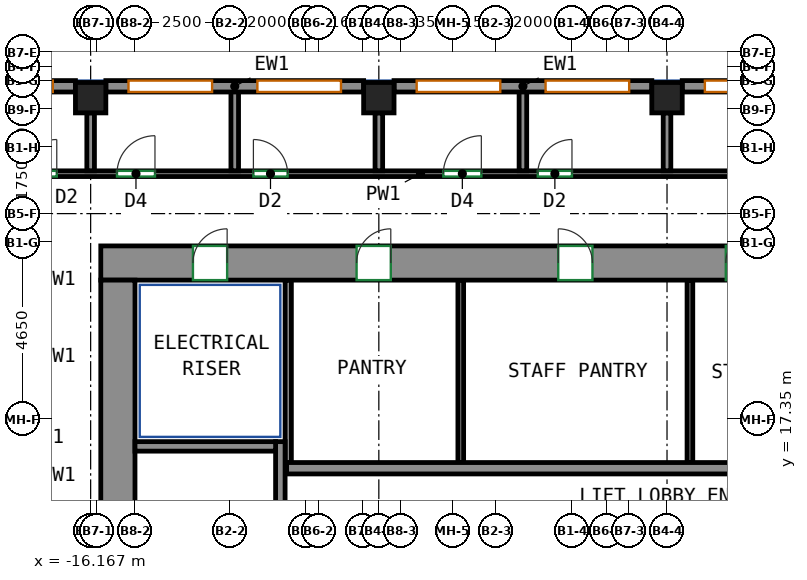
"""IFC4 building model, lengths in metres.
Left out: names, types, materials, properties, quantities, classifications, styles, units other than length and angle.
Written with IfcOpenShell. Run it as: python <this file> out.ifc"""

import sys

from ifc_helpers import new_model, si_unit, direction, frame, frame_2d, origin, origin_2d, place, context, subcontext, project, spatial, rectangle, extrude, source, transform, mapped, element, fill, save


model = new_model("IFC4")
c1 = context("Model", 3, precision=1e-05, world=origin(), true_north=direction((0.0, 1.0)))
c2 = subcontext(c1, "Body", "Model", "MODEL_VIEW")
j1 = project(units=[si_unit("LENGTHUNIT", "METRE"), si_unit("PLANEANGLEUNIT", "RADIAN")], contexts=[c1])
p1 = place(None, origin())
s1 = spatial("IfcSite", under=j1, at=p1, CompositionType="ELEMENT")
p2 = place(p1, origin())
s2 = spatial("IfcBuilding", under=s1, at=p2, CompositionType="ELEMENT")
p3 = place(p2, frame((0.0, 0.0, 171.9)))
s3 = spatial("IfcBuildingStorey", under=s2, at=p3, CompositionType="ELEMENT", Elevation=171.9)
m1 = source(origin(), c2, "Body", "SweptSolid", [
    extrude(rectangle(XDim=0.8, YDim=0.8, at=origin_2d()), origin(), (0.0, 0.0, 1.0), 3.12),
])
for number, where, z_axis, x_axis in (
    (1, (-16.167, 25.8, 0.0), (0.0, 0.0, 1.0), (1.0, 0.0, 0.0)),
    (2, (-8.583, 25.8, 0.0), (0.0, 0.0, 1.0), (1.0, 0.0, 0.0)),
    (3, (-1.0, 25.8, 0.0), (0.0, 0.0, 1.0), (1.0, 0.0, 0.0)),
):
    element("IfcColumn", number, at=place(p3, frame(where, z_axis=z_axis, x_axis=x_axis)), inside=s3, PredefinedType="COLUMN", context=c2, shape_type="MappedRepresentation", body=[
        mapped(m1, transform((0.0, 0.0, 0.0))),
    ])
m2 = source(origin(), c2, "Body", "SweptSolid", [
    extrude(rectangle(XDim=33.9, YDim=0.9, at=frame_2d((16.95, 0.0))), origin(), (0.0, 0.0, 1.0), 3.12),
])
p4 = place(p3, frame((-15.9, 21.45, 0.0), z_axis=(0.0, 0.0, 1.0), x_axis=(1.0, 0.0, 0.0)))
e4 = element("IfcWall", 4, at=p4, inside=s3, PredefinedType="SHEAR", context=c2, shape_type="MappedRepresentation", body=[
    mapped(m2, transform((0.0, 0.0, 0.0))),
])
p5 = place(p4, frame((6.731, 0.0, 0.0)))
e5 = element("IfcOpeningElement", 5, at=p5, cuts=e4, PredefinedType="OPENING", context=c2, shape_type="SweptSolid", body=[
    extrude(rectangle(XDim=0.9, YDim=2.1, at=frame_2d((0.45, 1.05))), frame((0.0, 0.46, 0.0), z_axis=(0.0, -1.0, 0.0), x_axis=(1.0, 0.0, 0.0)), (0.0, 0.0, 1.0), 0.92),
])
p6 = place(p4, frame((12.038, 0.0, 0.0)))
e6 = element("IfcOpeningElement", 6, at=p6, cuts=e4, PredefinedType="OPENING", context=c2, shape_type="SweptSolid", body=[
    extrude(rectangle(XDim=0.9, YDim=2.1, at=frame_2d((0.45, 1.05))), frame((0.0, 0.46, 0.0), z_axis=(0.0, -1.0, 0.0), x_axis=(1.0, 0.0, 0.0)), (0.0, 0.0, 1.0), 0.92),
])
p7 = place(p4, frame((16.446, 0.0, 0.0)))
e7 = element("IfcOpeningElement", 7, at=p7, cuts=e4, PredefinedType="OPENING", context=c2, shape_type="SweptSolid", body=[
    extrude(rectangle(XDim=0.9, YDim=2.1, at=frame_2d((0.45, 1.05))), frame((0.0, 0.46, 0.0), z_axis=(0.0, -1.0, 0.0), x_axis=(1.0, 0.0, 0.0)), (0.0, 0.0, 1.0), 0.92),
])
p8 = place(p4, frame((18.858, 0.0, 0.0)))
e8 = element("IfcOpeningElement", 8, at=p8, cuts=e4, PredefinedType="OPENING", context=c2, shape_type="SweptSolid", body=[
    extrude(rectangle(XDim=0.9, YDim=2.1, at=frame_2d((0.45, 1.05))), frame((0.0, 0.46, 0.0), z_axis=(0.0, -1.0, 0.0), x_axis=(1.0, 0.0, 0.0)), (0.0, 0.0, 1.0), 0.92),
])
p9 = place(p4, frame((21.686, 0.0, 0.0)))
e9 = element("IfcOpeningElement", 9, at=p9, cuts=e4, PredefinedType="OPENING", context=c2, shape_type="SweptSolid", body=[
    extrude(rectangle(XDim=0.9, YDim=2.1, at=frame_2d((0.45, 1.05))), frame((0.0, 0.46, 0.0), z_axis=(0.0, -1.0, 0.0), x_axis=(1.0, 0.0, 0.0)), (0.0, 0.0, 1.0), 0.92),
])
p10 = place(p4, frame((26.027, 0.0, 0.0)))
e10 = element("IfcOpeningElement", 10, at=p10, cuts=e4, PredefinedType="OPENING", context=c2, shape_type="SweptSolid", body=[
    extrude(rectangle(XDim=0.9, YDim=2.1, at=frame_2d((0.45, 1.05))), frame((0.0, 0.46, 0.0), z_axis=(0.0, -1.0, 0.0), x_axis=(1.0, 0.0, 0.0)), (0.0, 0.0, 1.0), 0.92),
])
p11 = place(p4, frame((2.425, 0.0, 0.0)))
e11 = element("IfcOpeningElement", 11, at=p11, cuts=e4, PredefinedType="OPENING", context=c2, shape_type="SweptSolid", body=[
    extrude(rectangle(XDim=0.9, YDim=2.1, at=frame_2d((0.45, 1.05))), frame((0.0, 0.46, 0.0), z_axis=(0.0, -1.0, 0.0), x_axis=(1.0, 0.0, 0.0)), (0.0, 0.0, 1.0), 0.92),
])
p12 = place(p4, frame((30.575, 0.0, 0.0)))
e12 = element("IfcOpeningElement", 12, at=p12, cuts=e4, PredefinedType="OPENING", context=c2, shape_type="SweptSolid", body=[
    extrude(rectangle(XDim=0.9, YDim=2.1, at=frame_2d((0.45, 1.05))), frame((0.0, 0.46, 0.0), z_axis=(0.0, -1.0, 0.0), x_axis=(1.0, 0.0, 0.0)), (0.0, 0.0, 1.0), 0.92),
])
m3 = source(origin(), c2, "Body", "SweptSolid", [
    extrude(rectangle(XDim=12.0, YDim=0.9, at=frame_2d((6.0, 0.0))), origin(), (0.0, 0.0, 1.0), 3.12),
])
p13 = place(p3, frame((-15.45, 9.0, 0.0), z_axis=(0.0, 0.0, 1.0), x_axis=(0.0, 1.0, 0.0)))
e13 = element("IfcWall", 13, at=p13, inside=s3, PredefinedType="SHEAR", context=c2, shape_type="MappedRepresentation", body=[
    mapped(m3, transform((0.0, 0.0, 0.0))),
])
m4 = source(origin(), c2, "Body", "SweptSolid", [
    extrude(rectangle(XDim=7.75, YDim=0.25, at=frame_2d((3.875, 0.0))), origin(), (0.0, 0.0, 1.0), 3.12),
])
p14 = place(p3, frame((-11.175, 9.0, 0.0), z_axis=(0.0, 0.0, 1.0), x_axis=(0.0, 1.0, 0.0)))
e14 = element("IfcWall", 14, at=p14, inside=s3, PredefinedType="SHEAR", context=c2, shape_type="MappedRepresentation", body=[
    mapped(m4, transform((0.0, 0.0, 0.0))),
])
m5 = source(origin(), c2, "Body", "SweptSolid", [
    extrude(rectangle(XDim=3.7, YDim=0.25, at=frame_2d((1.85, 0.0))), origin(), (0.0, 0.0, 1.0), 3.12),
])
p15 = place(p3, frame((-15.0, 16.625, 0.0), z_axis=(0.0, 0.0, 1.0), x_axis=(1.0, 0.0, 0.0)))
e15 = element("IfcWall", 15, at=p15, inside=s3, PredefinedType="SHEAR", context=c2, shape_type="MappedRepresentation", body=[
    mapped(m5, transform((0.0, 0.0, 0.0))),
])
m6 = source(origin(), c2, "Body", "SweptSolid", [
    extrude(rectangle(XDim=14.04, YDim=0.3, at=frame_2d((7.02, 0.0))), origin(), (0.0, 0.0, 1.0), 3.12),
])
p16 = place(p3, frame((-11.01, 16.05, 0.0), z_axis=(0.0, 0.0, 1.0), x_axis=(1.0, 0.0, 0.0)))
e16 = element("IfcWall", 16, at=p16, inside=s3, PredefinedType="SHEAR", context=c2, shape_type="MappedRepresentation", body=[
    mapped(m6, transform((0.0, 0.0, 0.0))),
])
m7 = source(origin(), c2, "Body", "SweptSolid", [
    extrude(rectangle(XDim=6.783, YDim=0.3, at=frame_2d((3.392, 0.0))), origin(), (0.0, 0.0, 1.0), 3.12),
])
p17 = place(p3, frame((6.183, 26.1, 0.0), z_axis=(0.0, 0.0, 1.0), x_axis=(-1.0, 0.0, 0.0)))
e17 = element("IfcWall", 17, at=p17, inside=s3, PredefinedType="SOLIDWALL", context=c2, shape_type="MappedRepresentation", body=[
    mapped(m7, transform((0.0, 0.0, 0.0))),
])
p18 = place(p17, frame((0.596, 0.0, 0.85)))
e18 = element("IfcOpeningElement", 18, at=p18, cuts=e17, PredefinedType="OPENING", context=c2, shape_type="SweptSolid", body=[
    extrude(rectangle(XDim=2.2, YDim=1.95, at=frame_2d((1.1, 0.975))), frame((0.0, 0.16, 0.0), z_axis=(0.0, -1.0, 0.0), x_axis=(1.0, 0.0, 0.0)), (0.0, 0.0, 1.0), 0.32),
])
p19 = place(p17, frame((3.988, 0.0, 0.85)))
e19 = element("IfcOpeningElement", 19, at=p19, cuts=e17, PredefinedType="OPENING", context=c2, shape_type="SweptSolid", body=[
    extrude(rectangle(XDim=2.2, YDim=1.95, at=frame_2d((1.1, 0.975))), frame((0.0, 0.16, 0.0), z_axis=(0.0, -1.0, 0.0), x_axis=(1.0, 0.0, 0.0)), (0.0, 0.0, 1.0), 0.32),
])
p20 = place(p3, frame((-1.4, 26.1, 0.0), z_axis=(0.0, 0.0, 1.0), x_axis=(-1.0, 0.0, 0.0)))
e20 = element("IfcWall", 20, at=p20, inside=s3, PredefinedType="SOLIDWALL", context=c2, shape_type="MappedRepresentation", body=[
    mapped(m7, transform((0.0, 0.0, 0.0))),
])
p21 = place(p20, frame((0.596, 0.0, 0.85)))
e21 = element("IfcOpeningElement", 21, at=p21, cuts=e20, PredefinedType="OPENING", context=c2, shape_type="SweptSolid", body=[
    extrude(rectangle(XDim=2.2, YDim=1.95, at=frame_2d((1.1, 0.975))), frame((0.0, 0.16, 0.0), z_axis=(0.0, -1.0, 0.0), x_axis=(1.0, 0.0, 0.0)), (0.0, 0.0, 1.0), 0.32),
])
p22 = place(p20, frame((3.988, 0.0, 0.85)))
e22 = element("IfcOpeningElement", 22, at=p22, cuts=e20, PredefinedType="OPENING", context=c2, shape_type="SweptSolid", body=[
    extrude(rectangle(XDim=2.2, YDim=1.95, at=frame_2d((1.1, 0.975))), frame((0.0, 0.16, 0.0), z_axis=(0.0, -1.0, 0.0), x_axis=(1.0, 0.0, 0.0)), (0.0, 0.0, 1.0), 0.32),
])
m8 = source(origin(), c2, "Body", "SweptSolid", [
    extrude(rectangle(XDim=6.783, YDim=0.3, at=frame_2d((3.392, 0.0))), origin(), (0.0, 0.0, 1.0), 3.12),
])
p23 = place(p3, frame((-8.983, 26.1, 0.0), z_axis=(0.0, 0.0, 1.0), x_axis=(-1.0, 0.0, 0.0)))
e23 = element("IfcWall", 23, at=p23, inside=s3, PredefinedType="SOLIDWALL", context=c2, shape_type="MappedRepresentation", body=[
    mapped(m8, transform((0.0, 0.0, 0.0))),
])
p24 = place(p23, frame((0.596, 0.0, 0.85)))
e24 = element("IfcOpeningElement", 24, at=p24, cuts=e23, PredefinedType="OPENING", context=c2, shape_type="SweptSolid", body=[
    extrude(rectangle(XDim=2.2, YDim=1.95, at=frame_2d((1.1, 0.975))), frame((0.0, 0.16, 0.0), z_axis=(0.0, -1.0, 0.0), x_axis=(1.0, 0.0, 0.0)), (0.0, 0.0, 1.0), 0.32),
])
p25 = place(p23, frame((3.988, 0.0, 0.85)))
e25 = element("IfcOpeningElement", 25, at=p25, cuts=e23, PredefinedType="OPENING", context=c2, shape_type="SweptSolid", body=[
    extrude(rectangle(XDim=2.2, YDim=1.95, at=frame_2d((1.1, 0.975))), frame((0.0, 0.16, 0.0), z_axis=(0.0, -1.0, 0.0), x_axis=(1.0, 0.0, 0.0)), (0.0, 0.0, 1.0), 0.32),
])
p26 = place(p3, frame((-16.567, 26.1, 0.0), z_axis=(0.0, 0.0, 1.0), x_axis=(-1.0, 0.0, 0.0)))
e26 = element("IfcWall", 26, at=p26, inside=s3, PredefinedType="SOLIDWALL", context=c2, shape_type="MappedRepresentation", body=[
    mapped(m7, transform((0.0, 0.0, 0.0))),
])
p27 = place(p26, frame((0.596, 0.0, 0.85)))
e27 = element("IfcOpeningElement", 27, at=p27, cuts=e26, PredefinedType="OPENING", context=c2, shape_type="SweptSolid", body=[
    extrude(rectangle(XDim=2.2, YDim=1.95, at=frame_2d((1.1, 0.975))), frame((0.0, 0.16, 0.0), z_axis=(0.0, -1.0, 0.0), x_axis=(1.0, 0.0, 0.0)), (0.0, 0.0, 1.0), 0.32),
])
p28 = place(p26, frame((3.988, 0.0, 0.85)))
e28 = element("IfcOpeningElement", 28, at=p28, cuts=e26, PredefinedType="OPENING", context=c2, shape_type="SweptSolid", body=[
    extrude(rectangle(XDim=2.2, YDim=1.95, at=frame_2d((1.1, 0.975))), frame((0.0, 0.16, 0.0), z_axis=(0.0, -1.0, 0.0), x_axis=(1.0, 0.0, 0.0)), (0.0, 0.0, 1.0), 0.32),
])
m9 = source(origin(), c2, "Body", "SweptSolid", [
    extrude(rectangle(XDim=4.8, YDim=0.165, at=frame_2d((2.4, 0.0))), origin(), (0.0, 0.0, 1.0), 3.12),
])
p29 = place(p3, frame((-10.968, 16.2, 0.0), z_axis=(0.0, 0.0, 1.0), x_axis=(0.0, 1.0, 0.0)))
e29 = element("IfcWall", 29, at=p29, inside=s3, PredefinedType="PARTITIONING", context=c2, shape_type="MappedRepresentation", body=[
    mapped(m9, transform((0.0, 0.0, 0.0))),
])
m10 = source(origin(), c2, "Body", "SweptSolid", [
    extrude(rectangle(XDim=4.8, YDim=0.15, at=frame_2d((2.4, 0.0))), origin(), (0.0, 0.0, 1.0), 3.12),
])
for number, where, z_axis, x_axis in (
    (30, (-6.427, 16.2, 0.0), (0.0, 0.0, 1.0), (0.0, 1.0, 0.0)),
    (31, (-0.397, 16.2, 0.0), (0.0, 0.0, 1.0), (0.0, 1.0, 0.0)),
):
    element("IfcWall", number, at=place(p3, frame(where, z_axis=z_axis, x_axis=x_axis)), inside=s3, PredefinedType="PARTITIONING", context=c2, shape_type="MappedRepresentation", body=[
        mapped(m10, transform((0.0, 0.0, 0.0))),
    ])
p30 = place(p3, frame((-20.059, 23.8, 0.0), z_axis=(0.0, 0.0, 1.0), x_axis=(1.0, 0.0, 0.0)))
e32 = element("IfcWall", 32, at=p30, inside=s3, PredefinedType="PARTITIONING", context=c2, shape_type="SweptSolid", body=[
    extrude(rectangle(XDim=41.909, YDim=0.15, at=frame_2d((20.955, 0.0))), origin(), (0.0, 0.0, 1.0), 3.12),
])
p31 = place(p30, frame((2.101, 0.0, 0.0)))
e33 = element("IfcOpeningElement", 33, at=p31, cuts=e32, PredefinedType="OPENING", context=c2, shape_type="SweptSolid", body=[
    extrude(rectangle(XDim=0.9, YDim=2.1, at=frame_2d((0.45, 1.05))), frame((0.0, 0.085, 0.0), z_axis=(0.0, -1.0, 0.0), x_axis=(1.0, 0.0, 0.0)), (0.0, 0.0, 1.0), 0.17),
])
p32 = place(p30, frame((4.585, 0.0, 0.0)))
e34 = element("IfcOpeningElement", 34, at=p32, cuts=e32, PredefinedType="OPENING", context=c2, shape_type="SweptSolid", body=[
    extrude(rectangle(XDim=1.0, YDim=2.1, at=frame_2d((0.5, 1.05))), frame((0.0, 0.085, 0.0), z_axis=(0.0, -1.0, 0.0), x_axis=(1.0, 0.0, 0.0)), (0.0, 0.0, 1.0), 0.17),
])
p33 = place(p30, frame((8.175, 0.0, 0.0)))
e35 = element("IfcOpeningElement", 35, at=p33, cuts=e32, PredefinedType="OPENING", context=c2, shape_type="SweptSolid", body=[
    extrude(rectangle(XDim=0.9, YDim=2.1, at=frame_2d((0.45, 1.05))), frame((0.0, 0.085, 0.0), z_axis=(0.0, -1.0, 0.0), x_axis=(1.0, 0.0, 0.0)), (0.0, 0.0, 1.0), 0.17),
])
p34 = place(p30, frame((13.173, 0.0, 0.0)))
e36 = element("IfcOpeningElement", 36, at=p34, cuts=e32, PredefinedType="OPENING", context=c2, shape_type="SweptSolid", body=[
    extrude(rectangle(XDim=1.0, YDim=2.1, at=frame_2d((0.5, 1.05))), frame((0.0, 0.085, 0.0), z_axis=(0.0, -1.0, 0.0), x_axis=(1.0, 0.0, 0.0)), (0.0, 0.0, 1.0), 0.17),
])
p35 = place(p30, frame((15.658, 0.0, 0.0)))
e37 = element("IfcOpeningElement", 37, at=p35, cuts=e32, PredefinedType="OPENING", context=c2, shape_type="SweptSolid", body=[
    extrude(rectangle(XDim=0.9, YDim=2.1, at=frame_2d((0.45, 1.05))), frame((0.0, 0.085, 0.0), z_axis=(0.0, -1.0, 0.0), x_axis=(1.0, 0.0, 0.0)), (0.0, 0.0, 1.0), 0.17),
])
p36 = place(p30, frame((21.315, 0.0, 0.0)))
e38 = element("IfcOpeningElement", 38, at=p36, cuts=e32, PredefinedType="OPENING", context=c2, shape_type="SweptSolid", body=[
    extrude(rectangle(XDim=0.9, YDim=2.1, at=frame_2d((0.45, 1.05))), frame((0.0, 0.085, 0.0), z_axis=(0.0, -1.0, 0.0), x_axis=(1.0, 0.0, 0.0)), (0.0, 0.0, 1.0), 0.17),
])
p37 = place(p30, frame((24.625, 0.0, 0.0)))
e39 = element("IfcOpeningElement", 39, at=p37, cuts=e32, PredefinedType="OPENING", context=c2, shape_type="SweptSolid", body=[
    extrude(rectangle(XDim=1.0, YDim=2.1, at=frame_2d((0.5, 1.05))), frame((0.0, 0.085, 0.0), z_axis=(0.0, -1.0, 0.0), x_axis=(1.0, 0.0, 0.0)), (0.0, 0.0, 1.0), 0.17),
])
p38 = place(p30, frame((29.043, 0.0, 0.0)))
e40 = element("IfcOpeningElement", 40, at=p38, cuts=e32, PredefinedType="OPENING", context=c2, shape_type="SweptSolid", body=[
    extrude(rectangle(XDim=0.9, YDim=2.1, at=frame_2d((0.45, 1.05))), frame((0.0, 0.085, 0.0), z_axis=(0.0, -1.0, 0.0), x_axis=(1.0, 0.0, 0.0)), (0.0, 0.0, 1.0), 0.17),
])
p39 = place(p30, frame((32.735, 0.0, 0.0)))
e41 = element("IfcOpeningElement", 41, at=p39, cuts=e32, PredefinedType="OPENING", context=c2, shape_type="SweptSolid", body=[
    extrude(rectangle(XDim=1.0, YDim=2.1, at=frame_2d((0.5, 1.05))), frame((0.0, 0.085, 0.0), z_axis=(0.0, -1.0, 0.0), x_axis=(1.0, 0.0, 0.0)), (0.0, 0.0, 1.0), 0.17),
])
p40 = place(p30, frame((36.627, 0.0, 0.0)))
e42 = element("IfcOpeningElement", 42, at=p40, cuts=e32, PredefinedType="OPENING", context=c2, shape_type="SweptSolid", body=[
    extrude(rectangle(XDim=0.9, YDim=2.1, at=frame_2d((0.45, 1.05))), frame((0.0, 0.085, 0.0), z_axis=(0.0, -1.0, 0.0), x_axis=(1.0, 0.0, 0.0)), (0.0, 0.0, 1.0), 0.17),
])
p41 = place(p30, frame((38.808, 0.0, 0.0)))
e43 = element("IfcOpeningElement", 43, at=p41, cuts=e32, PredefinedType="OPENING", context=c2, shape_type="SweptSolid", body=[
    extrude(rectangle(XDim=0.9, YDim=2.1, at=frame_2d((0.45, 1.05))), frame((0.0, 0.085, 0.0), z_axis=(0.0, -1.0, 0.0), x_axis=(1.0, 0.0, 0.0)), (0.0, 0.0, 1.0), 0.17),
])
p42 = place(p3, frame((-16.167, 23.877, 0.0), z_axis=(0.0, 0.0, 1.0), x_axis=(0.0, 1.0, 0.0)))
e44 = element("IfcWall", 44, at=p42, inside=s3, PredefinedType="PARTITIONING", context=c2, shape_type="SweptSolid", body=[
    extrude(rectangle(XDim=1.523, YDim=0.2, at=frame_2d((0.761, 0.0))), origin(), (0.0, 0.0, 1.0), 3.12),
])
p43 = place(p3, frame((-12.375, 23.877, 0.0), z_axis=(0.0, 0.0, 1.0), x_axis=(0.0, 1.0, 0.0)))
e45 = element("IfcWall", 45, at=p43, inside=s3, PredefinedType="PARTITIONING", context=c2, shape_type="SweptSolid", body=[
    extrude(rectangle(XDim=2.123, YDim=0.2, at=frame_2d((1.062, 0.0))), origin(), (0.0, 0.0, 1.0), 3.12),
])
p44 = place(p3, frame((-8.583, 23.877, 0.0), z_axis=(0.0, 0.0, 1.0), x_axis=(0.0, 1.0, 0.0)))
e46 = element("IfcWall", 46, at=p44, inside=s3, PredefinedType="PARTITIONING", context=c2, shape_type="SweptSolid", body=[
    extrude(rectangle(XDim=1.523, YDim=0.2, at=frame_2d((0.761, 0.0))), origin(), (0.0, 0.0, 1.0), 3.12),
])
p45 = place(p3, frame((-4.792, 23.877, 0.0), z_axis=(0.0, 0.0, 1.0), x_axis=(0.0, 1.0, 0.0)))
e47 = element("IfcWall", 47, at=p45, inside=s3, PredefinedType="PARTITIONING", context=c2, shape_type="SweptSolid", body=[
    extrude(rectangle(XDim=2.123, YDim=0.2, at=frame_2d((1.062, 0.0))), origin(), (0.0, 0.0, 1.0), 3.12),
])
p46 = place(p3, frame((-1.0, 23.877, 0.0), z_axis=(0.0, 0.0, 1.0), x_axis=(0.0, 1.0, 0.0)))
e48 = element("IfcWall", 48, at=p46, inside=s3, PredefinedType="PARTITIONING", context=c2, shape_type="SweptSolid", body=[
    extrude(rectangle(XDim=1.523, YDim=0.2, at=frame_2d((0.761, 0.0))), origin(), (0.0, 0.0, 1.0), 3.12),
])
p47 = place(p19, origin())
e49 = element("IfcWindow", 49, at=p47, inside=s3, PartitioningType="SINGLE_PANEL", PredefinedType="WINDOW", context=c2, shape_type="SweptSolid", body=[
    extrude(rectangle(XDim=2.2, YDim=1.95, at=frame_2d((1.1, 0.975))), frame((0.0, 0.03, 0.0), z_axis=(0.0, -1.0, 0.0), x_axis=(1.0, 0.0, 0.0)), (0.0, 0.0, 1.0), 0.06),
])
fill(e19, e49)
p48 = place(p21, origin())
e50 = element("IfcWindow", 50, at=p48, inside=s3, PartitioningType="SINGLE_PANEL", PredefinedType="WINDOW", context=c2, shape_type="SweptSolid", body=[
    extrude(rectangle(XDim=2.2, YDim=1.95, at=frame_2d((1.1, 0.975))), frame((0.0, 0.03, 0.0), z_axis=(0.0, -1.0, 0.0), x_axis=(1.0, 0.0, 0.0)), (0.0, 0.0, 1.0), 0.06),
])
fill(e21, e50)
p49 = place(p22, origin())
e51 = element("IfcWindow", 51, at=p49, inside=s3, PartitioningType="SINGLE_PANEL", PredefinedType="WINDOW", context=c2, shape_type="SweptSolid", body=[
    extrude(rectangle(XDim=2.2, YDim=1.95, at=frame_2d((1.1, 0.975))), frame((0.0, 0.03, 0.0), z_axis=(0.0, -1.0, 0.0), x_axis=(1.0, 0.0, 0.0)), (0.0, 0.0, 1.0), 0.06),
])
fill(e22, e51)
p50 = place(p24, origin())
e52 = element("IfcWindow", 52, at=p50, inside=s3, PartitioningType="SINGLE_PANEL", PredefinedType="WINDOW", context=c2, shape_type="SweptSolid", body=[
    extrude(rectangle(XDim=2.2, YDim=1.95, at=frame_2d((1.1, 0.975))), frame((0.0, 0.03, 0.0), z_axis=(0.0, -1.0, 0.0), x_axis=(1.0, 0.0, 0.0)), (0.0, 0.0, 1.0), 0.06),
])
fill(e24, e52)
p51 = place(p25, origin())
e53 = element("IfcWindow", 53, at=p51, inside=s3, PartitioningType="SINGLE_PANEL", PredefinedType="WINDOW", context=c2, shape_type="SweptSolid", body=[
    extrude(rectangle(XDim=2.2, YDim=1.95, at=frame_2d((1.1, 0.975))), frame((0.0, 0.03, 0.0), z_axis=(0.0, -1.0, 0.0), x_axis=(1.0, 0.0, 0.0)), (0.0, 0.0, 1.0), 0.06),
])
fill(e25, e53)
p52 = place(p27, origin())
e54 = element("IfcWindow", 54, at=p52, inside=s3, PartitioningType="SINGLE_PANEL", PredefinedType="WINDOW", context=c2, shape_type="SweptSolid", body=[
    extrude(rectangle(XDim=2.2, YDim=1.95, at=frame_2d((1.1, 0.975))), frame((0.0, 0.03, 0.0), z_axis=(0.0, -1.0, 0.0), x_axis=(1.0, 0.0, 0.0)), (0.0, 0.0, 1.0), 0.06),
])
fill(e27, e54)
p53 = place(p5, origin())
e55 = element("IfcDoor", 55, at=p53, inside=s3, OperationType="SINGLE_SWING_RIGHT", PredefinedType="DOOR", context=c2, shape_type="SweptSolid", body=[
    extrude(rectangle(XDim=0.9, YDim=2.1, at=frame_2d((0.45, 1.05))), frame((0.0, -0.305, 0.0), z_axis=(0.0, -1.0, 0.0), x_axis=(1.0, 0.0, 0.0)), (0.0, 0.0, 1.0), 0.05),
])
fill(e5, e55)
p54 = place(p6, origin())
e56 = element("IfcDoor", 56, at=p54, inside=s3, OperationType="SINGLE_SWING_LEFT", PredefinedType="DOOR", context=c2, shape_type="SweptSolid", body=[
    extrude(rectangle(XDim=0.9, YDim=2.1, at=frame_2d((0.45, 1.05))), frame((0.0, -0.305, 0.0), z_axis=(0.0, -1.0, 0.0), x_axis=(1.0, 0.0, 0.0)), (0.0, 0.0, 1.0), 0.05),
])
fill(e6, e56)
p55 = place(p7, origin())
e57 = element("IfcDoor", 57, at=p55, inside=s3, OperationType="SINGLE_SWING_RIGHT", PredefinedType="DOOR", context=c2, shape_type="SweptSolid", body=[
    extrude(rectangle(XDim=0.9, YDim=2.1, at=frame_2d((0.45, 1.05))), frame((0.0, -0.305, 0.0), z_axis=(0.0, -1.0, 0.0), x_axis=(1.0, 0.0, 0.0)), (0.0, 0.0, 1.0), 0.05),
])
fill(e7, e57)
p56 = place(p11, origin())
e58 = element("IfcDoor", 58, at=p56, inside=s3, OperationType="SINGLE_SWING_RIGHT", PredefinedType="DOOR", context=c2, shape_type="SweptSolid", body=[
    extrude(rectangle(XDim=0.9, YDim=2.1, at=frame_2d((0.45, 1.05))), frame((0.0, -0.305, 0.0), z_axis=(0.0, -1.0, 0.0), x_axis=(1.0, 0.0, 0.0)), (0.0, 0.0, 1.0), 0.05),
])
fill(e11, e58)
p57 = place(p31, origin())
e59 = element("IfcDoor", 59, at=p57, inside=s3, OperationType="SINGLE_SWING_RIGHT", PredefinedType="DOOR", context=c2, shape_type="SweptSolid", body=[
    extrude(rectangle(XDim=0.9, YDim=2.1, at=frame_2d((0.45, 1.05))), frame((0.0, 0.025, 0.0), z_axis=(0.0, -1.0, 0.0), x_axis=(1.0, 0.0, 0.0)), (0.0, 0.0, 1.0), 0.05),
])
fill(e33, e59)
p58 = place(p32, origin())
e60 = element("IfcDoor", 60, at=p58, inside=s3, OperationType="SINGLE_SWING_RIGHT", PredefinedType="DOOR", context=c2, shape_type="SweptSolid", body=[
    extrude(rectangle(XDim=1.0, YDim=2.1, at=frame_2d((0.5, 1.05))), frame((0.0, 0.025, 0.0), z_axis=(0.0, -1.0, 0.0), x_axis=(1.0, 0.0, 0.0)), (0.0, 0.0, 1.0), 0.05),
])
fill(e34, e60)
p59 = place(p33, origin())
e61 = element("IfcDoor", 61, at=p59, inside=s3, OperationType="SINGLE_SWING_LEFT", PredefinedType="DOOR", context=c2, shape_type="SweptSolid", body=[
    extrude(rectangle(XDim=0.9, YDim=2.1, at=frame_2d((0.45, 1.05))), frame((0.0, 0.025, 0.0), z_axis=(0.0, -1.0, 0.0), x_axis=(1.0, 0.0, 0.0)), (0.0, 0.0, 1.0), 0.05),
])
fill(e35, e61)
p60 = place(p34, origin())
e62 = element("IfcDoor", 62, at=p60, inside=s3, OperationType="SINGLE_SWING_RIGHT", PredefinedType="DOOR", context=c2, shape_type="SweptSolid", body=[
    extrude(rectangle(XDim=1.0, YDim=2.1, at=frame_2d((0.5, 1.05))), frame((0.0, 0.025, 0.0), z_axis=(0.0, -1.0, 0.0), x_axis=(1.0, 0.0, 0.0)), (0.0, 0.0, 1.0), 0.05),
])
fill(e36, e62)
p61 = place(p35, origin())
e63 = element("IfcDoor", 63, at=p61, inside=s3, OperationType="SINGLE_SWING_RIGHT", PredefinedType="DOOR", context=c2, shape_type="SweptSolid", body=[
    extrude(rectangle(XDim=0.9, YDim=2.1, at=frame_2d((0.45, 1.05))), frame((0.0, 0.025, 0.0), z_axis=(0.0, -1.0, 0.0), x_axis=(1.0, 0.0, 0.0)), (0.0, 0.0, 1.0), 0.05),
])
fill(e37, e63)
save(model, sys.argv[1])
